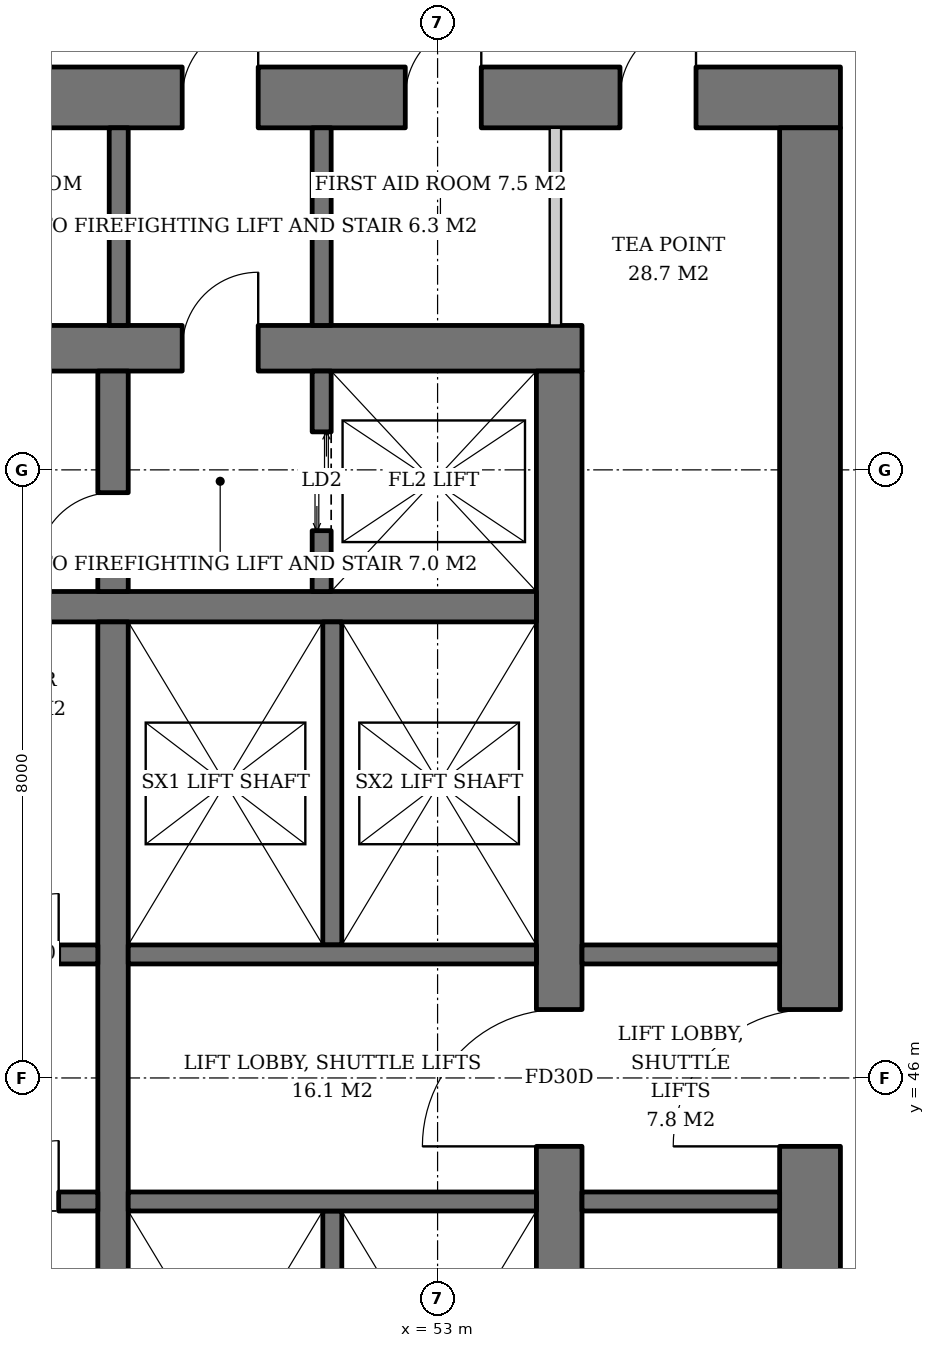
"""IFC4 building model, lengths in metres.
Left out: names, types, materials, properties, quantities, classifications, styles, units other than length and angle.
Written with IfcOpenShell. Run it as: python <this file> out.ifc"""

import sys

from ifc_helpers import new_model, si_unit, direction, frame, frame_2d, origin, place, context, subcontext, project, spatial, rectangle, extrude, element, fill, save


model = new_model("IFC4")
c1 = context("Model", 3, precision=1e-05, world=origin(), true_north=direction((0.0, 1.0)))
c2 = subcontext(c1, "Body", "Model", "MODEL_VIEW")
j1 = project(units=[si_unit("LENGTHUNIT", "METRE"), si_unit("PLANEANGLEUNIT", "RADIAN")], contexts=[c1])
p1 = place(None, origin())
s1 = spatial("IfcSite", under=j1, at=p1, CompositionType="ELEMENT")
p2 = place(p1, origin())
s2 = spatial("IfcBuilding", under=s1, at=p2, CompositionType="ELEMENT")
p3 = place(p2, frame((0.0, 0.0, 51.4)))
s3 = spatial("IfcBuildingStorey", under=s2, at=p3, CompositionType="ELEMENT", Elevation=51.4)
p4 = place(p3, frame((35.1, 55.6, 0.0), z_axis=(0.0, 0.0, 1.0), x_axis=(1.0, 0.0, 0.0)))
e1 = element("IfcWall", 1, at=p4, inside=s3, PredefinedType="SHEAR", context=c2, shape_type="SweptSolid", body=[
    extrude(rectangle(XDim=19.8, YDim=0.6, at=frame_2d((9.9, 0.0))), origin(), (0.0, 0.0, 1.0), 3.8),
])
p5 = place(p4, frame((14.54, 0.0, 0.0)))
e2 = element("IfcOpeningElement", 2, at=p5, cuts=e1, PredefinedType="OPENING", context=c2, shape_type="SweptSolid", body=[
    extrude(rectangle(XDim=1.0, YDim=2.1, at=frame_2d((0.5, 1.05))), frame((0.0, 0.31, 0.0), z_axis=(0.0, -1.0, 0.0), x_axis=(1.0, 0.0, 0.0)), (0.0, 0.0, 1.0), 0.62),
])
p6 = place(p4, frame((2.425, 0.0, 0.0)))
e3 = element("IfcOpeningElement", 3, at=p6, cuts=e1, PredefinedType="OPENING", context=c2, shape_type="SweptSolid", body=[
    extrude(rectangle(XDim=1.0, YDim=2.1, at=frame_2d((0.5, 1.05))), frame((0.0, 0.31, 0.0), z_axis=(0.0, -1.0, 0.0), x_axis=(1.0, 0.0, 0.0)), (0.0, 0.0, 1.0), 0.62),
])
p7 = place(p3, frame((54.6, 36.7, 0.0), z_axis=(0.0, 0.0, 1.0), x_axis=(0.0, 1.0, 0.0)))
e4 = element("IfcWall", 4, at=p7, inside=s3, PredefinedType="SHEAR", context=c2, shape_type="SweptSolid", body=[
    extrude(rectangle(XDim=18.6, YDim=0.6, at=frame_2d((9.3, 0.0))), origin(), (0.0, 0.0, 1.0), 3.8),
])
p8 = place(p7, frame((8.4, 0.0, 0.0)))
e5 = element("IfcOpeningElement", 5, at=p8, cuts=e4, PredefinedType="OPENING", context=c2, shape_type="SweptSolid", body=[
    extrude(rectangle(XDim=1.8, YDim=2.4, at=frame_2d((0.9, 1.2))), frame((0.0, 0.31, 0.0), z_axis=(0.0, -1.0, 0.0), x_axis=(1.0, 0.0, 0.0)), (0.0, 0.0, 1.0), 0.62),
])
p9 = place(p3, frame((31.7, 58.9, 0.0), z_axis=(0.0, 0.0, 1.0), x_axis=(1.0, 0.0, 0.0)))
e6 = element("IfcWall", 6, at=p9, inside=s3, PredefinedType="SHEAR", context=c2, shape_type="SweptSolid", body=[
    extrude(rectangle(XDim=26.6, YDim=0.8, at=frame_2d((13.3, 0.0))), origin(), (0.0, 0.0, 1.0), 3.8),
])
p10 = place(p9, frame((17.94, 0.0, 0.0)))
e7 = element("IfcOpeningElement", 7, at=p10, cuts=e6, PredefinedType="OPENING", context=c2, shape_type="SweptSolid", body=[
    extrude(rectangle(XDim=1.0, YDim=2.1, at=frame_2d((0.5, 1.05))), frame((0.0, 0.41, 0.0), z_axis=(0.0, -1.0, 0.0), x_axis=(1.0, 0.0, 0.0)), (0.0, 0.0, 1.0), 0.82),
])
p11 = place(p9, frame((5.825, 0.0, 0.0)))
e8 = element("IfcOpeningElement", 8, at=p11, cuts=e6, PredefinedType="OPENING", context=c2, shape_type="SweptSolid", body=[
    extrude(rectangle(XDim=1.0, YDim=2.1, at=frame_2d((0.5, 1.05))), frame((0.0, 0.41, 0.0), z_axis=(0.0, -1.0, 0.0), x_axis=(1.0, 0.0, 0.0)), (0.0, 0.0, 1.0), 0.82),
])
p12 = place(p9, frame((1.9, 0.0, 0.0)))
e9 = element("IfcOpeningElement", 9, at=p12, cuts=e6, PredefinedType="OPENING", context=c2, shape_type="SweptSolid", body=[
    extrude(rectangle(XDim=1.0, YDim=2.1, at=frame_2d((0.5, 1.05))), frame((0.0, 0.41, 0.0), z_axis=(0.0, -1.0, 0.0), x_axis=(1.0, 0.0, 0.0)), (0.0, 0.0, 1.0), 0.82),
])
p13 = place(p9, frame((4.134, 0.0, 0.0)))
e10 = element("IfcOpeningElement", 10, at=p13, cuts=e6, PredefinedType="OPENING", context=c2, shape_type="SweptSolid", body=[
    extrude(rectangle(XDim=1.0, YDim=2.1, at=frame_2d((0.5, 1.05))), frame((0.0, 0.41, 0.0), z_axis=(0.0, -1.0, 0.0), x_axis=(1.0, 0.0, 0.0)), (0.0, 0.0, 1.0), 0.82),
])
p14 = place(p9, frame((8.342, 0.0, 0.0)))
e11 = element("IfcOpeningElement", 11, at=p14, cuts=e6, PredefinedType="OPENING", context=c2, shape_type="SweptSolid", body=[
    extrude(rectangle(XDim=1.0, YDim=2.1, at=frame_2d((0.5, 1.05))), frame((0.0, 0.41, 0.0), z_axis=(0.0, -1.0, 0.0), x_axis=(1.0, 0.0, 0.0)), (0.0, 0.0, 1.0), 0.82),
])
p15 = place(p9, frame((11.626, 0.0, 0.0)))
e12 = element("IfcOpeningElement", 12, at=p15, cuts=e6, PredefinedType="OPENING", context=c2, shape_type="SweptSolid", body=[
    extrude(rectangle(XDim=1.0, YDim=2.1, at=frame_2d((0.5, 1.05))), frame((0.0, 0.41, 0.0), z_axis=(0.0, -1.0, 0.0), x_axis=(1.0, 0.0, 0.0)), (0.0, 0.0, 1.0), 0.82),
])
p16 = place(p9, frame((14.862, 0.0, 0.0)))
e13 = element("IfcOpeningElement", 13, at=p16, cuts=e6, PredefinedType="OPENING", context=c2, shape_type="SweptSolid", body=[
    extrude(rectangle(XDim=1.0, YDim=2.1, at=frame_2d((0.5, 1.05))), frame((0.0, 0.41, 0.0), z_axis=(0.0, -1.0, 0.0), x_axis=(1.0, 0.0, 0.0)), (0.0, 0.0, 1.0), 0.82),
])
p17 = place(p9, frame((20.875, 0.0, 0.0)))
e14 = element("IfcOpeningElement", 14, at=p17, cuts=e6, PredefinedType="OPENING", context=c2, shape_type="SweptSolid", body=[
    extrude(rectangle(XDim=1.0, YDim=2.1, at=frame_2d((0.5, 1.05))), frame((0.0, 0.41, 0.0), z_axis=(0.0, -1.0, 0.0), x_axis=(1.0, 0.0, 0.0)), (0.0, 0.0, 1.0), 0.82),
])
p18 = place(p9, frame((23.7, 0.0, 0.0)))
e15 = element("IfcOpeningElement", 15, at=p18, cuts=e6, PredefinedType="OPENING", context=c2, shape_type="SweptSolid", body=[
    extrude(rectangle(XDim=1.0, YDim=2.1, at=frame_2d((0.5, 1.05))), frame((0.0, 0.41, 0.0), z_axis=(0.0, -1.0, 0.0), x_axis=(1.0, 0.0, 0.0)), (0.0, 0.0, 1.0), 0.82),
])
p19 = place(p3, frame((57.9, 33.5, 0.0), z_axis=(0.0, 0.0, 1.0), x_axis=(0.0, 1.0, 0.0)))
e16 = element("IfcWall", 16, at=p19, inside=s3, PredefinedType="SHEAR", context=c2, shape_type="SweptSolid", body=[
    extrude(rectangle(XDim=25.0, YDim=0.8, at=frame_2d((12.5, 0.0))), origin(), (0.0, 0.0, 1.0), 3.8),
])
p20 = place(p19, frame((11.6, 0.0, 0.0)))
e17 = element("IfcOpeningElement", 17, at=p20, cuts=e16, PredefinedType="OPENING", context=c2, shape_type="SweptSolid", body=[
    extrude(rectangle(XDim=1.8, YDim=2.4, at=frame_2d((0.9, 1.2))), frame((0.0, 0.41, 0.0), z_axis=(0.0, -1.0, 0.0), x_axis=(1.0, 0.0, 0.0)), (0.0, 0.0, 1.0), 0.82),
])
p21 = place(p3, frame((35.7, 52.2, 0.0), z_axis=(0.0, 0.0, 1.0), x_axis=(1.0, 0.0, 0.0)))
e18 = element("IfcWall", 18, at=p21, inside=s3, PredefinedType="SHEAR", context=c2, shape_type="SweptSolid", body=[
    extrude(rectangle(XDim=18.6, YDim=0.4, at=frame_2d((9.3, 0.0))), origin(), (0.0, 0.0, 1.0), 3.8),
])
p22 = place(p3, frame((48.73, 40.0, 0.0), z_axis=(0.0, 0.0, 1.0), x_axis=(0.0, 1.0, 0.0)))
e19 = element("IfcWall", 19, at=p22, inside=s3, PredefinedType="SHEAR", context=c2, shape_type="SweptSolid", body=[
    extrude(rectangle(XDim=12.0, YDim=0.4, at=frame_2d((6.0, 0.0))), origin(), (0.0, 0.0, 1.0), 3.8),
])
p23 = place(p3, frame((48.73, 52.4, 0.0), z_axis=(0.0, 0.0, 1.0), x_axis=(0.0, 1.0, 0.0)))
e20 = element("IfcWall", 20, at=p23, inside=s3, PredefinedType="SHEAR", context=c2, shape_type="SweptSolid", body=[
    extrude(rectangle(XDim=2.9, YDim=0.4, at=frame_2d((1.45, 0.0))), origin(), (0.0, 0.0, 1.0), 3.8),
])
p24 = place(p23, frame((0.3, 0.0, 0.0)))
e21 = element("IfcOpeningElement", 21, at=p24, cuts=e20, PredefinedType="OPENING", context=c2, shape_type="SweptSolid", body=[
    extrude(rectangle(XDim=1.0, YDim=2.1, at=frame_2d((0.5, 1.05))), frame((0.0, 0.21, 0.0), z_axis=(0.0, -1.0, 0.0), x_axis=(1.0, 0.0, 0.0)), (0.0, 0.0, 1.0), 0.42),
])
p25 = place(p3, frame((51.475, 52.4, 0.0), z_axis=(0.0, 0.0, 1.0), x_axis=(0.0, 1.0, 0.0)))
e22 = element("IfcWall", 22, at=p25, inside=s3, PredefinedType="SHEAR", context=c2, shape_type="SweptSolid", body=[
    extrude(rectangle(XDim=2.9, YDim=0.25, at=frame_2d((1.45, 0.0))), origin(), (0.0, 0.0, 1.0), 3.8),
])
p26 = place(p25, frame((0.8, 0.0, 0.0)))
e23 = element("IfcOpeningElement", 23, at=p26, cuts=e22, PredefinedType="OPENING", context=c2, shape_type="SweptSolid", body=[
    extrude(rectangle(XDim=1.3, YDim=2.2, at=frame_2d((0.65, 1.1))), frame((0.0, 0.135, 0.0), z_axis=(0.0, -1.0, 0.0), x_axis=(1.0, 0.0, 0.0)), (0.0, 0.0, 1.0), 0.27),
])
p27 = place(p3, frame((35.7, 47.625, 0.0), z_axis=(0.0, 0.0, 1.0), x_axis=(1.0, 0.0, 0.0)))
e24 = element("IfcWall", 24, at=p27, inside=s3, PredefinedType="SHEAR", context=c2, shape_type="SweptSolid", body=[
    extrude(rectangle(XDim=12.83, YDim=0.25, at=frame_2d((6.415, 0.0))), origin(), (0.0, 0.0, 1.0), 3.8),
])
p28 = place(p27, frame((0.7, 0.0, 0.0)))
e25 = element("IfcOpeningElement", 25, at=p28, cuts=e24, PredefinedType="OPENING", context=c2, shape_type="SweptSolid", body=[
    extrude(rectangle(XDim=1.1, YDim=2.2, at=frame_2d((0.55, 1.1))), frame((0.0, 0.135, 0.0), z_axis=(0.0, -1.0, 0.0), x_axis=(1.0, 0.0, 0.0)), (0.0, 0.0, 1.0), 0.27),
])
p29 = place(p27, frame((3.45, 0.0, 0.0)))
e26 = element("IfcOpeningElement", 26, at=p29, cuts=e24, PredefinedType="OPENING", context=c2, shape_type="SweptSolid", body=[
    extrude(rectangle(XDim=1.1, YDim=2.2, at=frame_2d((0.55, 1.1))), frame((0.0, 0.135, 0.0), z_axis=(0.0, -1.0, 0.0), x_axis=(1.0, 0.0, 0.0)), (0.0, 0.0, 1.0), 0.27),
])
p30 = place(p27, frame((6.2, 0.0, 0.0)))
e27 = element("IfcOpeningElement", 27, at=p30, cuts=e24, PredefinedType="OPENING", context=c2, shape_type="SweptSolid", body=[
    extrude(rectangle(XDim=1.1, YDim=2.2, at=frame_2d((0.55, 1.1))), frame((0.0, 0.135, 0.0), z_axis=(0.0, -1.0, 0.0), x_axis=(1.0, 0.0, 0.0)), (0.0, 0.0, 1.0), 0.27),
])
p31 = place(p27, frame((8.95, 0.0, 0.0)))
e28 = element("IfcOpeningElement", 28, at=p31, cuts=e24, PredefinedType="OPENING", context=c2, shape_type="SweptSolid", body=[
    extrude(rectangle(XDim=1.1, YDim=2.2, at=frame_2d((0.55, 1.1))), frame((0.0, 0.135, 0.0), z_axis=(0.0, -1.0, 0.0), x_axis=(1.0, 0.0, 0.0)), (0.0, 0.0, 1.0), 0.27),
])
p32 = place(p27, frame((11.515, 0.0, 0.0)))
e29 = element("IfcOpeningElement", 29, at=p32, cuts=e24, PredefinedType="OPENING", context=c2, shape_type="SweptSolid", body=[
    extrude(rectangle(XDim=0.8, YDim=2.0, at=frame_2d((0.4, 1.0))), frame((0.0, 0.135, 0.0), z_axis=(0.0, -1.0, 0.0), x_axis=(1.0, 0.0, 0.0)), (0.0, 0.0, 1.0), 0.27),
])
p33 = place(p3, frame((35.7, 44.375, 0.0), z_axis=(0.0, 0.0, 1.0), x_axis=(1.0, 0.0, 0.0)))
e30 = element("IfcWall", 30, at=p33, inside=s3, PredefinedType="SHEAR", context=c2, shape_type="SweptSolid", body=[
    extrude(rectangle(XDim=12.83, YDim=0.25, at=frame_2d((6.415, 0.0))), origin(), (0.0, 0.0, 1.0), 3.8),
])
p34 = place(p33, frame((0.7, 0.0, 0.0)))
e31 = element("IfcOpeningElement", 31, at=p34, cuts=e30, PredefinedType="OPENING", context=c2, shape_type="SweptSolid", body=[
    extrude(rectangle(XDim=1.1, YDim=2.2, at=frame_2d((0.55, 1.1))), frame((0.0, 0.135, 0.0), z_axis=(0.0, -1.0, 0.0), x_axis=(1.0, 0.0, 0.0)), (0.0, 0.0, 1.0), 0.27),
])
p35 = place(p33, frame((3.45, 0.0, 0.0)))
e32 = element("IfcOpeningElement", 32, at=p35, cuts=e30, PredefinedType="OPENING", context=c2, shape_type="SweptSolid", body=[
    extrude(rectangle(XDim=1.1, YDim=2.2, at=frame_2d((0.55, 1.1))), frame((0.0, 0.135, 0.0), z_axis=(0.0, -1.0, 0.0), x_axis=(1.0, 0.0, 0.0)), (0.0, 0.0, 1.0), 0.27),
])
p36 = place(p33, frame((6.2, 0.0, 0.0)))
e33 = element("IfcOpeningElement", 33, at=p36, cuts=e30, PredefinedType="OPENING", context=c2, shape_type="SweptSolid", body=[
    extrude(rectangle(XDim=1.1, YDim=2.2, at=frame_2d((0.55, 1.1))), frame((0.0, 0.135, 0.0), z_axis=(0.0, -1.0, 0.0), x_axis=(1.0, 0.0, 0.0)), (0.0, 0.0, 1.0), 0.27),
])
p37 = place(p33, frame((8.95, 0.0, 0.0)))
e34 = element("IfcOpeningElement", 34, at=p37, cuts=e30, PredefinedType="OPENING", context=c2, shape_type="SweptSolid", body=[
    extrude(rectangle(XDim=1.1, YDim=2.2, at=frame_2d((0.55, 1.1))), frame((0.0, 0.135, 0.0), z_axis=(0.0, -1.0, 0.0), x_axis=(1.0, 0.0, 0.0)), (0.0, 0.0, 1.0), 0.27),
])
p38 = place(p33, frame((11.515, 0.0, 0.0)))
e35 = element("IfcOpeningElement", 35, at=p38, cuts=e30, PredefinedType="OPENING", context=c2, shape_type="SweptSolid", body=[
    extrude(rectangle(XDim=0.8, YDim=2.0, at=frame_2d((0.4, 1.0))), frame((0.0, 0.135, 0.0), z_axis=(0.0, -1.0, 0.0), x_axis=(1.0, 0.0, 0.0)), (0.0, 0.0, 1.0), 0.27),
])
p39 = place(p3, frame((51.615, 47.75, 0.0), z_axis=(0.0, 0.0, 1.0), x_axis=(0.0, 1.0, 0.0)))
e36 = element("IfcWall", 36, at=p39, inside=s3, PredefinedType="SHEAR", context=c2, shape_type="SweptSolid", body=[
    extrude(rectangle(XDim=4.25, YDim=0.25, at=frame_2d((2.125, 0.0))), origin(), (0.0, 0.0, 1.0), 3.8),
])
p40 = place(p3, frame((48.93, 47.625, 0.0), z_axis=(0.0, 0.0, 1.0), x_axis=(1.0, 0.0, 0.0)))
e37 = element("IfcWall", 37, at=p40, inside=s3, PredefinedType="SHEAR", context=c2, shape_type="SweptSolid", body=[
    extrude(rectangle(XDim=5.37, YDim=0.25, at=frame_2d((2.685, 0.0))), origin(), (0.0, 0.0, 1.0), 3.8),
])
p41 = place(p3, frame((51.615, 44.25, 0.0), z_axis=(0.0, 0.0, 1.0), x_axis=(0.0, -1.0, 0.0)))
e38 = element("IfcWall", 38, at=p41, inside=s3, PredefinedType="SHEAR", context=c2, shape_type="SweptSolid", body=[
    extrude(rectangle(XDim=4.25, YDim=0.25, at=frame_2d((2.125, 0.0))), origin(), (0.0, 0.0, 1.0), 3.8),
])
p42 = place(p3, frame((48.93, 44.375, 0.0), z_axis=(0.0, 0.0, 1.0), x_axis=(1.0, 0.0, 0.0)))
e39 = element("IfcWall", 39, at=p42, inside=s3, PredefinedType="SHEAR", context=c2, shape_type="SweptSolid", body=[
    extrude(rectangle(XDim=5.37, YDim=0.25, at=frame_2d((2.685, 0.0))), origin(), (0.0, 0.0, 1.0), 3.8),
])
for number, where, z_axis, x_axis in (
    (40, (48.805, 55.9, 0.0), (0.0, 0.0, 1.0), (0.0, 1.0, 0.0)),
    (41, (51.475, 55.9, 0.0), (0.0, 0.0, 1.0), (0.0, 1.0, 0.0)),
    (42, (54.9, 44.375, 0.0), (0.0, 0.0, 1.0), (1.0, 0.0, 0.0)),
    (43, (54.9, 47.625, 0.0), (0.0, 0.0, 1.0), (1.0, 0.0, 0.0)),
):
    element("IfcWall", number, at=place(p3, frame(where, z_axis=z_axis, x_axis=x_axis)), inside=s3, PredefinedType="SOLIDWALL", context=c2, shape_type="SweptSolid", body=[
        extrude(rectangle(XDim=2.6, YDim=0.25, at=frame_2d((1.3, 0.0))), origin(), (0.0, 0.0, 1.0), 3.62),
    ])
p43 = place(p3, frame((54.55, 55.9, 0.0), z_axis=(0.0, 0.0, 1.0), x_axis=(0.0, 1.0, 0.0)))
e44 = element("IfcWall", 44, at=p43, inside=s3, PredefinedType="SOLIDWALL", context=c2, shape_type="SweptSolid", body=[
    extrude(rectangle(XDim=2.6, YDim=0.15, at=frame_2d((1.3, 0.0))), origin(), (0.0, 0.0, 1.0), 3.62),
])
p44 = place(p26, origin())
e45 = element("IfcDoor", 45, at=p44, inside=s3, OperationType="DOUBLE_DOOR_SLIDING", PredefinedType="DOOR", context=c2, shape_type="SweptSolid", body=[
    extrude(rectangle(XDim=1.3, YDim=2.2, at=frame_2d((0.65, 1.1))), frame((0.0, 0.025, 0.0), z_axis=(0.0, -1.0, 0.0), x_axis=(1.0, 0.0, 0.0)), (0.0, 0.0, 1.0), 0.05),
])
fill(e23, e45)
p45 = place(p32, origin())
e46 = element("IfcDoor", 46, at=p45, inside=s3, OperationType="SINGLE_SWING_RIGHT", PredefinedType="DOOR", context=c2, shape_type="SweptSolid", body=[
    extrude(rectangle(XDim=0.8, YDim=2.0, at=frame_2d((0.4, 1.0))), frame((0.0, 0.025, 0.0), z_axis=(0.0, -1.0, 0.0), x_axis=(1.0, 0.0, 0.0)), (0.0, 0.0, 1.0), 0.05),
])
fill(e29, e46)
p46 = place(p38, origin())
e47 = element("IfcDoor", 47, at=p46, inside=s3, OperationType="SINGLE_SWING_RIGHT", PredefinedType="DOOR", context=c2, shape_type="SweptSolid", body=[
    extrude(rectangle(XDim=0.8, YDim=2.0, at=frame_2d((0.4, 1.0))), frame((0.0, 0.025, 0.0), z_axis=(0.0, -1.0, 0.0), x_axis=(1.0, 0.0, 0.0)), (0.0, 0.0, 1.0), 0.05),
])
fill(e35, e47)
p47 = place(p24, origin())
e48 = element("IfcDoor", 48, at=p47, inside=s3, OperationType="SINGLE_SWING_LEFT", PredefinedType="DOOR", context=c2, shape_type="SweptSolid", body=[
    extrude(rectangle(XDim=1.0, YDim=2.1, at=frame_2d((0.5, 1.05))), frame((0.0, 0.025, 0.0), z_axis=(0.0, -1.0, 0.0), x_axis=(1.0, 0.0, 0.0)), (0.0, 0.0, 1.0), 0.05),
])
fill(e21, e48)
p48 = place(p5, origin())
e49 = element("IfcDoor", 49, at=p48, inside=s3, OperationType="SINGLE_SWING_RIGHT", PredefinedType="DOOR", context=c2, shape_type="SweptSolid", body=[
    extrude(rectangle(XDim=1.0, YDim=2.1, at=frame_2d((0.5, 1.05))), frame((0.0, 0.025, 0.0), z_axis=(0.0, -1.0, 0.0), x_axis=(1.0, 0.0, 0.0)), (0.0, 0.0, 1.0), 0.05),
])
fill(e2, e49)
p49 = place(p8, origin())
e50 = element("IfcDoor", 50, at=p49, inside=s3, OperationType="DOUBLE_DOOR_SINGLE_SWING", PredefinedType="DOOR", context=c2, shape_type="SweptSolid", body=[
    extrude(rectangle(XDim=1.8, YDim=2.4, at=frame_2d((0.9, 1.2))), frame((0.0, 0.025, 0.0), z_axis=(0.0, -1.0, 0.0), x_axis=(1.0, 0.0, 0.0)), (0.0, 0.0, 1.0), 0.05),
])
fill(e5, e50)
p50 = place(p20, origin())
e51 = element("IfcDoor", 51, at=p50, inside=s3, OperationType="DOUBLE_DOOR_SINGLE_SWING", PredefinedType="DOOR", context=c2, shape_type="SweptSolid", body=[
    extrude(rectangle(XDim=1.8, YDim=2.4, at=frame_2d((0.9, 1.2))), frame((0.0, 0.025, 0.0), z_axis=(0.0, -1.0, 0.0), x_axis=(1.0, 0.0, 0.0)), (0.0, 0.0, 1.0), 0.05),
])
fill(e17, e51)
p51 = place(p10, origin())
e52 = element("IfcDoor", 52, at=p51, inside=s3, OperationType="SINGLE_SWING_RIGHT", PredefinedType="DOOR", context=c2, shape_type="SweptSolid", body=[
    extrude(rectangle(XDim=1.0, YDim=2.1, at=frame_2d((0.5, 1.05))), frame((0.0, 0.025, 0.0), z_axis=(0.0, -1.0, 0.0), x_axis=(1.0, 0.0, 0.0)), (0.0, 0.0, 1.0), 0.05),
])
fill(e7, e52)
p52 = place(p17, origin())
e53 = element("IfcDoor", 53, at=p52, inside=s3, OperationType="SINGLE_SWING_RIGHT", PredefinedType="DOOR", context=c2, shape_type="SweptSolid", body=[
    extrude(rectangle(XDim=1.0, YDim=2.1, at=frame_2d((0.5, 1.05))), frame((0.0, -0.34, 0.0), z_axis=(0.0, -1.0, 0.0), x_axis=(1.0, 0.0, 0.0)), (0.0, 0.0, 1.0), 0.05),
])
fill(e14, e53)
p53 = place(p18, origin())
e54 = element("IfcDoor", 54, at=p53, inside=s3, OperationType="SINGLE_SWING_RIGHT", PredefinedType="DOOR", context=c2, shape_type="SweptSolid", body=[
    extrude(rectangle(XDim=1.0, YDim=2.1, at=frame_2d((0.5, 1.05))), frame((0.0, -0.34, 0.0), z_axis=(0.0, -1.0, 0.0), x_axis=(1.0, 0.0, 0.0)), (0.0, 0.0, 1.0), 0.05),
])
fill(e15, e54)
save(model, sys.argv[1])
